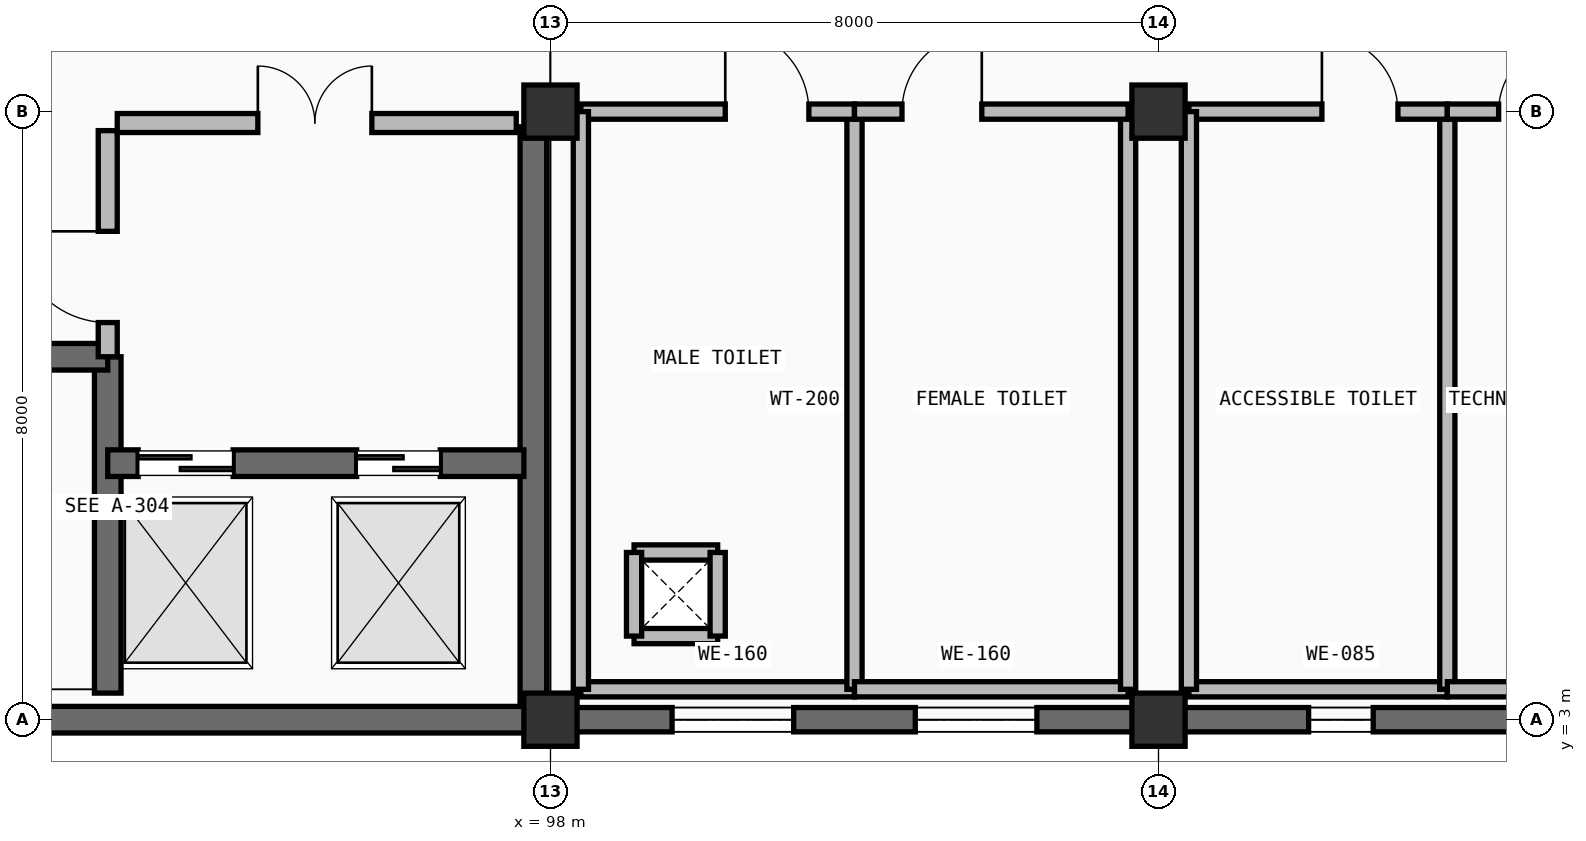
"""IFC4 building model, lengths in metres.
Left out: names, types, materials, properties, quantities, classifications, styles, units other than length and angle.
Written with IfcOpenShell. Run it as: python <this file> out.ifc"""

import sys

from ifc_helpers import new_model, si_unit, direction, frame, frame_2d, origin, origin_2d, place, context, subcontext, project, spatial, rectangle, extrude, element, fill, save


model = new_model("IFC4")
c1 = context("Model", 3, precision=1e-05, world=origin(), true_north=direction((0.0, 1.0)))
c2 = subcontext(c1, "Body", "Model", "MODEL_VIEW")
j1 = project(units=[si_unit("LENGTHUNIT", "METRE"), si_unit("PLANEANGLEUNIT", "RADIAN")], contexts=[c1])
p1 = place(None, origin())
s1 = spatial("IfcSite", under=j1, at=p1, CompositionType="ELEMENT")
p2 = place(p1, origin())
s2 = spatial("IfcBuilding", under=s1, at=p2, CompositionType="ELEMENT")
p3 = place(p2, frame((0.0, 0.0, 9.9)))
s3 = spatial("IfcBuildingStorey", under=s2, at=p3, CompositionType="ELEMENT", Elevation=9.9)
for number, where, z_axis, x_axis in (
    (1, (98.0, 3.0, 0.0), (0.0, 0.0, 1.0), (1.0, 0.0, 0.0)),
    (2, (98.0, 11.0, 0.0), (0.0, 0.0, 1.0), (1.0, 0.0, 0.0)),
    (3, (106.0, 3.0, 0.0), (0.0, 0.0, 1.0), (1.0, 0.0, 0.0)),
    (4, (106.0, 11.0, 0.0), (0.0, 0.0, 1.0), (1.0, 0.0, 0.0)),
):
    element("IfcColumn", number, at=place(p3, frame(where, z_axis=z_axis, x_axis=x_axis)), inside=s3, PredefinedType="COLUMN", context=c2, shape_type="SweptSolid", body=[
        extrude(rectangle(XDim=0.7, YDim=0.7, at=origin_2d()), origin(), (0.0, 0.0, 1.0), 4.5),
    ])
p4 = place(p3, frame((114.0, 3.0, 0.0), z_axis=(0.0, 0.0, 1.0), x_axis=(-1.0, 0.0, 0.0)))
e5 = element("IfcWall", 5, at=p4, inside=s3, PredefinedType="SOLIDWALL", context=c2, shape_type="SweptSolid", body=[
    extrude(rectangle(XDim=8.0, YDim=0.32, at=frame_2d((4.0, 0.0))), origin(), (0.0, 0.0, 1.0), 4.5),
])
p5 = place(p4, frame((1.975, 0.0, 1.0)))
e6 = element("IfcOpeningElement", 6, at=p5, cuts=e5, PredefinedType="OPENING", context=c2, shape_type="SweptSolid", body=[
    extrude(rectangle(XDim=0.85, YDim=1.2, at=frame_2d((0.425, 0.6))), frame((0.0, 0.17, 0.0), z_axis=(0.0, -1.0, 0.0), x_axis=(1.0, 0.0, 0.0)), (0.0, 0.0, 1.0), 0.34),
])
p6 = place(p4, frame((5.175, 0.0, 1.0)))
e7 = element("IfcOpeningElement", 7, at=p6, cuts=e5, PredefinedType="OPENING", context=c2, shape_type="SweptSolid", body=[
    extrude(rectangle(XDim=0.85, YDim=1.2, at=frame_2d((0.425, 0.6))), frame((0.0, 0.17, 0.0), z_axis=(0.0, -1.0, 0.0), x_axis=(1.0, 0.0, 0.0)), (0.0, 0.0, 1.0), 0.34),
])
p7 = place(p3, frame((106.0, 3.0, 0.0), z_axis=(0.0, 0.0, 1.0), x_axis=(-1.0, 0.0, 0.0)))
e8 = element("IfcWall", 8, at=p7, inside=s3, PredefinedType="SOLIDWALL", context=c2, shape_type="SweptSolid", body=[
    extrude(rectangle(XDim=8.0, YDim=0.32, at=frame_2d((4.0, 0.0))), origin(), (0.0, 0.0, 1.0), 4.5),
])
p8 = place(p7, frame((1.6, 0.0, 1.0)))
e9 = element("IfcOpeningElement", 9, at=p8, cuts=e8, PredefinedType="OPENING", context=c2, shape_type="SweptSolid", body=[
    extrude(rectangle(XDim=1.6, YDim=2.0, at=frame_2d((0.8, 1.0))), frame((0.0, 0.17, 0.0), z_axis=(0.0, -1.0, 0.0), x_axis=(1.0, 0.0, 0.0)), (0.0, 0.0, 1.0), 0.34),
])
p9 = place(p7, frame((4.8, 0.0, 1.0)))
e10 = element("IfcOpeningElement", 10, at=p9, cuts=e8, PredefinedType="OPENING", context=c2, shape_type="SweptSolid", body=[
    extrude(rectangle(XDim=1.6, YDim=2.0, at=frame_2d((0.8, 1.0))), frame((0.0, 0.17, 0.0), z_axis=(0.0, -1.0, 0.0), x_axis=(1.0, 0.0, 0.0)), (0.0, 0.0, 1.0), 0.34),
])
p10 = place(p3, frame((98.0, 3.0, 0.0), z_axis=(0.0, 0.0, 1.0), x_axis=(-1.0, 0.0, 0.0)))
e11 = element("IfcWall", 11, at=p10, inside=s3, PredefinedType="SHEAR", context=c2, shape_type="SweptSolid", body=[
    extrude(rectangle(XDim=8.0, YDim=0.35, at=frame_2d((4.0, 0.0))), origin(), (0.0, 0.0, 1.0), 4.5),
])
p11 = place(p3, frame((92.175, 3.35, 0.0), z_axis=(0.0, 0.0, 1.0), x_axis=(0.0, 1.0, 0.0)))
e12 = element("IfcWall", 12, at=p11, inside=s3, PredefinedType="SHEAR", context=c2, shape_type="SweptSolid", body=[
    extrude(rectangle(XDim=4.425, YDim=0.35, at=frame_2d((2.212, 0.0))), origin(), (0.0, 0.0, 1.0), 4.2),
])
p12 = place(p3, frame((97.775, 3.2, 0.0), z_axis=(0.0, 0.0, 1.0), x_axis=(0.0, 1.0, 0.0)))
e13 = element("IfcWall", 13, at=p12, inside=s3, PredefinedType="SHEAR", context=c2, shape_type="SweptSolid", body=[
    extrude(rectangle(XDim=7.6, YDim=0.35, at=frame_2d((3.8, 0.0))), origin(), (0.0, 0.0, 1.0), 4.2),
])
p13 = place(p3, frame((82.35, 7.775, 0.0), z_axis=(0.0, 0.0, 1.0), x_axis=(1.0, 0.0, 0.0)))
e14 = element("IfcWall", 14, at=p13, inside=s3, PredefinedType="SHEAR", context=c2, shape_type="SweptSolid", body=[
    extrude(rectangle(XDim=9.825, YDim=0.35, at=frame_2d((4.913, 0.0))), origin(), (0.0, 0.0, 1.0), 4.2),
])
p14 = place(p13, frame((0.4, 0.0, 0.0)))
e15 = element("IfcOpeningElement", 15, at=p14, cuts=e14, PredefinedType="OPENING", context=c2, shape_type="SweptSolid", body=[
    extrude(rectangle(XDim=1.85, YDim=2.25, at=frame_2d((0.925, 1.125))), frame((0.0, 0.185, 0.0), z_axis=(0.0, -1.0, 0.0), x_axis=(1.0, 0.0, 0.0)), (0.0, 0.0, 1.0), 0.37),
])
p15 = place(p3, frame((92.175, 6.375, 0.0), z_axis=(0.0, 0.0, 1.0), x_axis=(1.0, 0.0, 0.0)))
e16 = element("IfcWall", 16, at=p15, inside=s3, PredefinedType="SHEAR", context=c2, shape_type="SweptSolid", body=[
    extrude(rectangle(XDim=5.475, YDim=0.35, at=frame_2d((2.737, 0.0))), origin(), (0.0, 0.0, 1.0), 4.2),
])
p16 = place(p15, frame((0.4, 0.0, 0.0)))
e17 = element("IfcOpeningElement", 17, at=p16, cuts=e16, PredefinedType="OPENING", context=c2, shape_type="SweptSolid", body=[
    extrude(rectangle(XDim=1.25, YDim=2.25, at=frame_2d((0.625, 1.125))), frame((0.0, 0.185, 0.0), z_axis=(0.0, -1.0, 0.0), x_axis=(1.0, 0.0, 0.0)), (0.0, 0.0, 1.0), 0.37),
])
p17 = place(p15, frame((3.275, 0.0, 0.0)))
e18 = element("IfcOpeningElement", 18, at=p17, cuts=e16, PredefinedType="OPENING", context=c2, shape_type="SweptSolid", body=[
    extrude(rectangle(XDim=1.1, YDim=2.2, at=frame_2d((0.55, 1.1))), frame((0.0, 0.185, 0.0), z_axis=(0.0, -1.0, 0.0), x_axis=(1.0, 0.0, 0.0)), (0.0, 0.0, 1.0), 0.37),
])
p18 = place(p3, frame((92.175, 7.775, 0.0), z_axis=(0.0, 0.0, 1.0), x_axis=(0.0, 1.0, 0.0)))
e19 = element("IfcWall", 19, at=p18, inside=s3, PredefinedType="PARTITIONING", context=c2, shape_type="SweptSolid", body=[
    extrude(rectangle(XDim=2.975, YDim=0.25, at=frame_2d((1.488, 0.0))), origin(), (0.0, 0.0, 1.0), 4.2),
])
p19 = place(p18, frame((0.45, 0.0, 0.0)))
e20 = element("IfcOpeningElement", 20, at=p19, cuts=e19, PredefinedType="OPENING", context=c2, shape_type="SweptSolid", body=[
    extrude(rectangle(XDim=1.2, YDim=2.2, at=frame_2d((0.6, 1.1))), frame((0.0, 0.135, 0.0), z_axis=(0.0, -1.0, 0.0), x_axis=(1.0, 0.0, 0.0)), (0.0, 0.0, 1.0), 0.27),
])
p20 = place(p3, frame((92.3, 10.85, 0.0), z_axis=(0.0, 0.0, 1.0), x_axis=(1.0, 0.0, 0.0)))
e21 = element("IfcWall", 21, at=p20, inside=s3, PredefinedType="PARTITIONING", context=c2, shape_type="SweptSolid", body=[
    extrude(rectangle(XDim=5.25, YDim=0.25, at=frame_2d((2.625, 0.0))), origin(), (0.0, 0.0, 1.0), 3.535),
])
p21 = place(p20, frame((1.85, 0.0, 0.0)))
e22 = element("IfcOpeningElement", 22, at=p21, cuts=e21, PredefinedType="OPENING", context=c2, shape_type="SweptSolid", body=[
    extrude(rectangle(XDim=1.5, YDim=2.2, at=frame_2d((0.75, 1.1))), frame((0.0, 0.135, 0.0), z_axis=(0.0, -1.0, 0.0), x_axis=(1.0, 0.0, 0.0)), (0.0, 0.0, 1.0), 0.27),
])
p22 = place(p3, frame((98.4, 3.4, 0.0), z_axis=(0.0, 0.0, 1.0), x_axis=(1.0, 0.0, 0.0)))
e23 = element("IfcWall", 23, at=p22, inside=s3, PredefinedType="PARTITIONING", context=c2, shape_type="SweptSolid", body=[
    extrude(rectangle(XDim=3.6, YDim=0.2, at=frame_2d((1.8, 0.0))), origin(), (0.0, 0.0, 1.0), 4.2),
])
p23 = place(p3, frame((102.0, 3.4, 0.0), z_axis=(0.0, 0.0, 1.0), x_axis=(0.0, 1.0, 0.0)))
e24 = element("IfcWall", 24, at=p23, inside=s3, PredefinedType="PARTITIONING", context=c2, shape_type="SweptSolid", body=[
    extrude(rectangle(XDim=7.6, YDim=0.2, at=frame_2d((3.8, 0.0))), origin(), (0.0, 0.0, 1.0), 4.2),
])
p24 = place(p3, frame((98.4, 11.0, 0.0), z_axis=(0.0, 0.0, 1.0), x_axis=(1.0, 0.0, 0.0)))
e25 = element("IfcWall", 25, at=p24, inside=s3, PredefinedType="PARTITIONING", context=c2, shape_type="SweptSolid", body=[
    extrude(rectangle(XDim=3.6, YDim=0.2, at=frame_2d((1.8, 0.0))), origin(), (0.0, 0.0, 1.0), 4.2),
])
p25 = place(p24, frame((1.9, 0.0, 0.0)))
e26 = element("IfcOpeningElement", 26, at=p25, cuts=e25, PredefinedType="OPENING", context=c2, shape_type="SweptSolid", body=[
    extrude(rectangle(XDim=1.1, YDim=2.15, at=frame_2d((0.55, 1.075))), frame((0.0, 0.11, 0.0), z_axis=(0.0, -1.0, 0.0), x_axis=(1.0, 0.0, 0.0)), (0.0, 0.0, 1.0), 0.22),
])
p26 = place(p3, frame((98.4, 3.4, 0.0), z_axis=(0.0, 0.0, 1.0), x_axis=(0.0, 1.0, 0.0)))
e27 = element("IfcWall", 27, at=p26, inside=s3, PredefinedType="PARTITIONING", context=c2, shape_type="SweptSolid", body=[
    extrude(rectangle(XDim=7.6, YDim=0.2, at=frame_2d((3.8, 0.0))), origin(), (0.0, 0.0, 1.0), 3.505),
])
p27 = place(p3, frame((102.0, 3.4, 0.0), z_axis=(0.0, 0.0, 1.0), x_axis=(1.0, 0.0, 0.0)))
e28 = element("IfcWall", 28, at=p27, inside=s3, PredefinedType="PARTITIONING", context=c2, shape_type="SweptSolid", body=[
    extrude(rectangle(XDim=3.6, YDim=0.2, at=frame_2d((1.8, 0.0))), origin(), (0.0, 0.0, 1.0), 4.2),
])
p28 = place(p3, frame((105.6, 3.4, 0.0), z_axis=(0.0, 0.0, 1.0), x_axis=(0.0, 1.0, 0.0)))
e29 = element("IfcWall", 29, at=p28, inside=s3, PredefinedType="PARTITIONING", context=c2, shape_type="SweptSolid", body=[
    extrude(rectangle(XDim=7.6, YDim=0.2, at=frame_2d((3.8, 0.0))), origin(), (0.0, 0.0, 1.0), 4.2),
])
p29 = place(p3, frame((102.0, 11.0, 0.0), z_axis=(0.0, 0.0, 1.0), x_axis=(1.0, 0.0, 0.0)))
e30 = element("IfcWall", 30, at=p29, inside=s3, PredefinedType="PARTITIONING", context=c2, shape_type="SweptSolid", body=[
    extrude(rectangle(XDim=3.6, YDim=0.2, at=frame_2d((1.8, 0.0))), origin(), (0.0, 0.0, 1.0), 4.2),
])
p30 = place(p29, frame((0.625, 0.0, 0.0)))
e31 = element("IfcOpeningElement", 31, at=p30, cuts=e30, PredefinedType="OPENING", context=c2, shape_type="SweptSolid", body=[
    extrude(rectangle(XDim=1.05, YDim=2.16, at=frame_2d((0.525, 1.08))), frame((0.0, 0.11, 0.0), z_axis=(0.0, -1.0, 0.0), x_axis=(1.0, 0.0, 0.0)), (0.0, 0.0, 1.0), 0.22),
])
p31 = place(p3, frame((106.4, 3.4, 0.0), z_axis=(0.0, 0.0, 1.0), x_axis=(1.0, 0.0, 0.0)))
e32 = element("IfcWall", 32, at=p31, inside=s3, PredefinedType="PARTITIONING", context=c2, shape_type="SweptSolid", body=[
    extrude(rectangle(XDim=3.4, YDim=0.2, at=frame_2d((1.7, 0.0))), origin(), (0.0, 0.0, 1.0), 4.2),
])
p32 = place(p3, frame((109.8, 3.4, 0.0), z_axis=(0.0, 0.0, 1.0), x_axis=(0.0, 1.0, 0.0)))
e33 = element("IfcWall", 33, at=p32, inside=s3, PredefinedType="PARTITIONING", context=c2, shape_type="SweptSolid", body=[
    extrude(rectangle(XDim=7.6, YDim=0.2, at=frame_2d((3.8, 0.0))), origin(), (0.0, 0.0, 1.0), 4.2),
])
p33 = place(p3, frame((106.4, 11.0, 0.0), z_axis=(0.0, 0.0, 1.0), x_axis=(1.0, 0.0, 0.0)))
e34 = element("IfcWall", 34, at=p33, inside=s3, PredefinedType="PARTITIONING", context=c2, shape_type="SweptSolid", body=[
    extrude(rectangle(XDim=3.4, YDim=0.2, at=frame_2d((1.7, 0.0))), origin(), (0.0, 0.0, 1.0), 4.2),
])
p34 = place(p33, frame((1.75, 0.0, 0.0)))
e35 = element("IfcOpeningElement", 35, at=p34, cuts=e34, PredefinedType="OPENING", context=c2, shape_type="SweptSolid", body=[
    extrude(rectangle(XDim=1.0, YDim=2.15, at=frame_2d((0.5, 1.075))), frame((0.0, 0.11, 0.0), z_axis=(0.0, -1.0, 0.0), x_axis=(1.0, 0.0, 0.0)), (0.0, 0.0, 1.0), 0.22),
])
p35 = place(p3, frame((106.4, 3.4, 0.0), z_axis=(0.0, 0.0, 1.0), x_axis=(0.0, 1.0, 0.0)))
e36 = element("IfcWall", 36, at=p35, inside=s3, PredefinedType="PARTITIONING", context=c2, shape_type="SweptSolid", body=[
    extrude(rectangle(XDim=7.6, YDim=0.2, at=frame_2d((3.8, 0.0))), origin(), (0.0, 0.0, 1.0), 4.2),
])
p36 = place(p3, frame((109.8, 3.4, 0.0), z_axis=(0.0, 0.0, 1.0), x_axis=(1.0, 0.0, 0.0)))
e37 = element("IfcWall", 37, at=p36, inside=s3, PredefinedType="PARTITIONING", context=c2, shape_type="SweptSolid", body=[
    extrude(rectangle(XDim=3.4, YDim=0.2, at=frame_2d((1.7, 0.0))), origin(), (0.0, 0.0, 1.0), 4.2),
])
p37 = place(p3, frame((109.8, 11.0, 0.0), z_axis=(0.0, 0.0, 1.0), x_axis=(1.0, 0.0, 0.0)))
e38 = element("IfcWall", 38, at=p37, inside=s3, PredefinedType="PARTITIONING", context=c2, shape_type="SweptSolid", body=[
    extrude(rectangle(XDim=3.4, YDim=0.2, at=frame_2d((1.7, 0.0))), origin(), (0.0, 0.0, 1.0), 4.2),
])
p38 = place(p37, frame((0.675, 0.0, 0.0)))
e39 = element("IfcOpeningElement", 39, at=p38, cuts=e38, PredefinedType="OPENING", context=c2, shape_type="SweptSolid", body=[
    extrude(rectangle(XDim=0.95, YDim=2.1, at=frame_2d((0.475, 1.05))), frame((0.0, 0.11, 0.0), z_axis=(0.0, -1.0, 0.0), x_axis=(1.0, 0.0, 0.0)), (0.0, 0.0, 1.0), 0.22),
])
for number, where, z_axis, x_axis in (
    (40, (99.1, 4.1, 0.0), (0.0, 0.0, 1.0), (1.0, 0.0, 0.0)),
    (41, (99.1, 5.2, 0.0), (0.0, 0.0, 1.0), (1.0, 0.0, 0.0)),
    (42, (99.1, 4.1, 0.0), (0.0, 0.0, 1.0), (0.0, 1.0, 0.0)),
    (43, (100.2, 4.1, 0.0), (0.0, 0.0, 1.0), (0.0, 1.0, 0.0)),
):
    element("IfcWall", number, at=place(p3, frame(where, z_axis=z_axis, x_axis=x_axis)), inside=s3, PredefinedType="PARTITIONING", context=c2, shape_type="SweptSolid", body=[
        extrude(rectangle(XDim=1.1, YDim=0.2, at=frame_2d((0.55, 0.0))), origin(), (0.0, 0.0, 1.0), 4.2),
    ])
p39 = place(p6, origin())
e44 = element("IfcWindow", 44, at=p39, inside=s3, PartitioningType="SINGLE_PANEL", PredefinedType="WINDOW", context=c2, shape_type="SweptSolid", body=[
    extrude(rectangle(XDim=0.85, YDim=1.2, at=frame_2d((0.425, 0.6))), frame((0.0, 0.03, 0.0), z_axis=(0.0, -1.0, 0.0), x_axis=(1.0, 0.0, 0.0)), (0.0, 0.0, 1.0), 0.06),
])
fill(e7, e44)
p40 = place(p8, origin())
e45 = element("IfcWindow", 45, at=p40, inside=s3, PartitioningType="SINGLE_PANEL", PredefinedType="WINDOW", context=c2, shape_type="SweptSolid", body=[
    extrude(rectangle(XDim=1.6, YDim=2.0, at=frame_2d((0.8, 1.0))), frame((0.0, 0.03, 0.0), z_axis=(0.0, -1.0, 0.0), x_axis=(1.0, 0.0, 0.0)), (0.0, 0.0, 1.0), 0.06),
])
fill(e9, e45)
p41 = place(p9, origin())
e46 = element("IfcWindow", 46, at=p41, inside=s3, PartitioningType="SINGLE_PANEL", PredefinedType="WINDOW", context=c2, shape_type="SweptSolid", body=[
    extrude(rectangle(XDim=1.6, YDim=2.0, at=frame_2d((0.8, 1.0))), frame((0.0, 0.03, 0.0), z_axis=(0.0, -1.0, 0.0), x_axis=(1.0, 0.0, 0.0)), (0.0, 0.0, 1.0), 0.06),
])
fill(e10, e46)
p42 = place(p16, origin())
e47 = element("IfcDoor", 47, at=p42, inside=s3, OperationType="DOUBLE_DOOR_SLIDING", PredefinedType="DOOR", context=c2, shape_type="SweptSolid", body=[
    extrude(rectangle(XDim=1.25, YDim=2.25, at=frame_2d((0.625, 1.125))), frame((0.0, 0.025, 0.0), z_axis=(0.0, -1.0, 0.0), x_axis=(1.0, 0.0, 0.0)), (0.0, 0.0, 1.0), 0.05),
])
fill(e17, e47)
p43 = place(p17, origin())
e48 = element("IfcDoor", 48, at=p43, inside=s3, OperationType="DOUBLE_DOOR_SLIDING", PredefinedType="DOOR", context=c2, shape_type="SweptSolid", body=[
    extrude(rectangle(XDim=1.1, YDim=2.2, at=frame_2d((0.55, 1.1))), frame((0.0, 0.025, 0.0), z_axis=(0.0, -1.0, 0.0), x_axis=(1.0, 0.0, 0.0)), (0.0, 0.0, 1.0), 0.05),
])
fill(e18, e48)
p44 = place(p19, origin())
e49 = element("IfcDoor", 49, at=p44, inside=s3, OperationType="SINGLE_SWING_RIGHT", PredefinedType="DOOR", context=c2, shape_type="SweptSolid", body=[
    extrude(rectangle(XDim=1.2, YDim=2.2, at=frame_2d((0.6, 1.1))), frame((0.0, 0.025, 0.0), z_axis=(0.0, -1.0, 0.0), x_axis=(1.0, 0.0, 0.0)), (0.0, 0.0, 1.0), 0.05),
])
fill(e20, e49)
p45 = place(p21, origin())
e50 = element("IfcDoor", 50, at=p45, inside=s3, OperationType="DOUBLE_DOOR_SINGLE_SWING", PredefinedType="DOOR", context=c2, shape_type="SweptSolid", body=[
    extrude(rectangle(XDim=1.5, YDim=2.2, at=frame_2d((0.75, 1.1))), frame((0.0, 0.025, 0.0), z_axis=(0.0, -1.0, 0.0), x_axis=(1.0, 0.0, 0.0)), (0.0, 0.0, 1.0), 0.05),
])
fill(e22, e50)
p46 = place(p25, origin())
e51 = element("IfcDoor", 51, at=p46, inside=s3, OperationType="SINGLE_SWING_LEFT", PredefinedType="DOOR", context=c2, shape_type="SweptSolid", body=[
    extrude(rectangle(XDim=1.1, YDim=2.15, at=frame_2d((0.55, 1.075))), frame((0.0, 0.025, 0.0), z_axis=(0.0, -1.0, 0.0), x_axis=(1.0, 0.0, 0.0)), (0.0, 0.0, 1.0), 0.05),
])
fill(e26, e51)
p47 = place(p30, origin())
e52 = element("IfcDoor", 52, at=p47, inside=s3, OperationType="SINGLE_SWING_RIGHT", PredefinedType="DOOR", context=c2, shape_type="SweptSolid", body=[
    extrude(rectangle(XDim=1.05, YDim=2.16, at=frame_2d((0.525, 1.08))), frame((0.0, 0.025, 0.0), z_axis=(0.0, -1.0, 0.0), x_axis=(1.0, 0.0, 0.0)), (0.0, 0.0, 1.0), 0.05),
])
fill(e31, e52)
p48 = place(p34, origin())
e53 = element("IfcDoor", 53, at=p48, inside=s3, OperationType="SINGLE_SWING_LEFT", PredefinedType="DOOR", context=c2, shape_type="SweptSolid", body=[
    extrude(rectangle(XDim=1.0, YDim=2.15, at=frame_2d((0.5, 1.075))), frame((0.0, 0.025, 0.0), z_axis=(0.0, -1.0, 0.0), x_axis=(1.0, 0.0, 0.0)), (0.0, 0.0, 1.0), 0.05),
])
fill(e35, e53)
p49 = place(p38, origin())
e54 = element("IfcDoor", 54, at=p49, inside=s3, OperationType="SINGLE_SWING_RIGHT", PredefinedType="DOOR", context=c2, shape_type="SweptSolid", body=[
    extrude(rectangle(XDim=0.95, YDim=2.1, at=frame_2d((0.475, 1.05))), frame((0.0, 0.025, 0.0), z_axis=(0.0, -1.0, 0.0), x_axis=(1.0, 0.0, 0.0)), (0.0, 0.0, 1.0), 0.05),
])
fill(e39, e54)
save(model, sys.argv[1])
